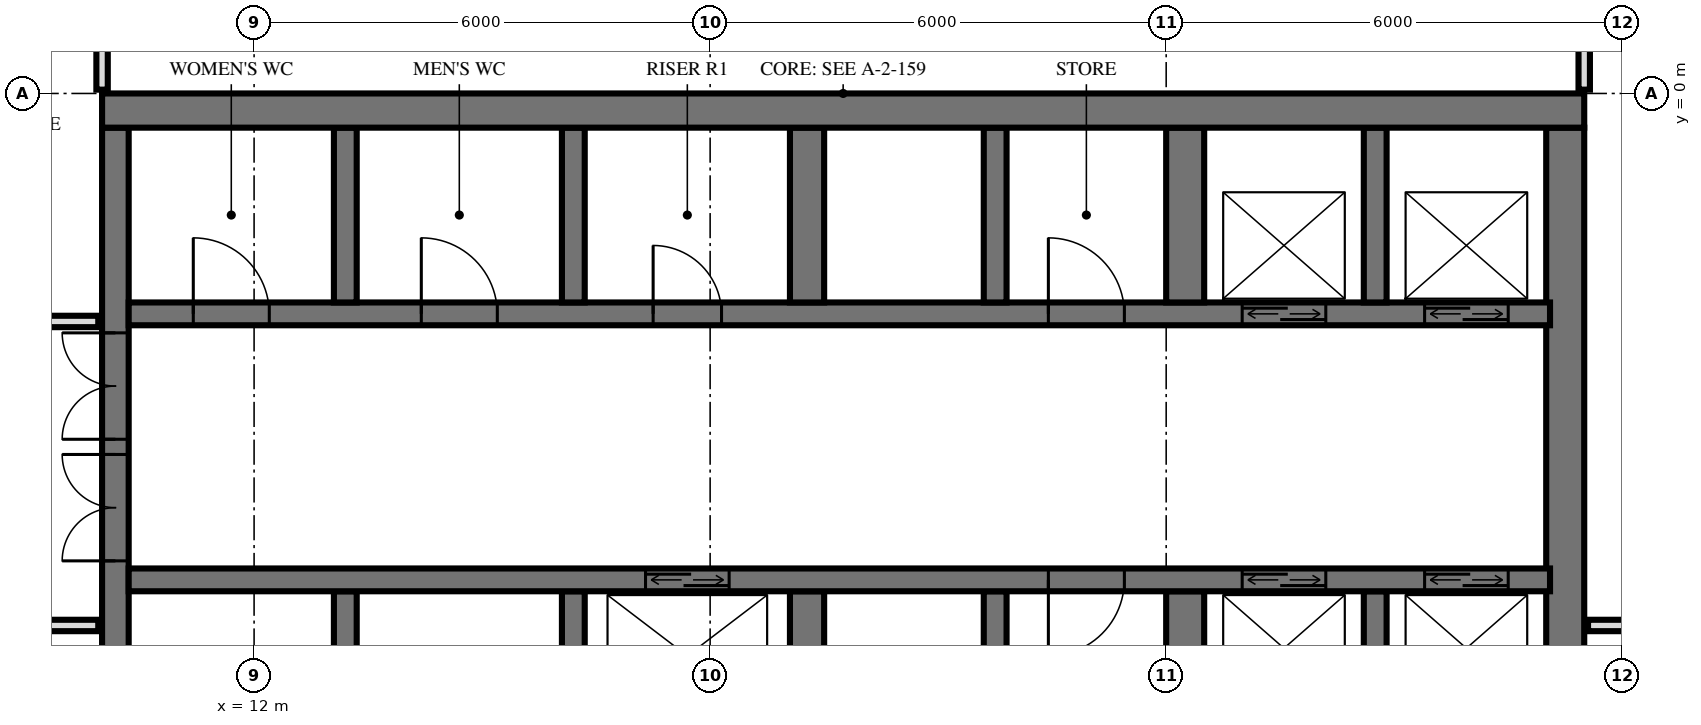
"""IFC4 building model, lengths in metres.
Left out: names, types, materials, properties, quantities, classifications, styles, units other than length and angle.
Written with IfcOpenShell. Run it as: python <this file> out.ifc"""

import sys

from ifc_helpers import new_model, si_unit, direction, frame, frame_2d, origin, place, context, subcontext, project, spatial, rectangle, extrude, element, fill, save


model = new_model("IFC4")
c1 = context("Model", 3, precision=1e-05, world=origin(), true_north=direction((0.0, 1.0)))
c2 = subcontext(c1, "Body", "Model", "MODEL_VIEW")
j1 = project(units=[si_unit("LENGTHUNIT", "METRE"), si_unit("PLANEANGLEUNIT", "RADIAN")], contexts=[c1])
p1 = place(None, origin())
s1 = spatial("IfcSite", under=j1, at=p1, CompositionType="ELEMENT")
p2 = place(p1, origin())
s2 = spatial("IfcBuilding", under=s1, at=p2, CompositionType="ELEMENT")
p3 = place(p2, frame((0.0, 0.0, 99.6)))
s3 = spatial("IfcBuildingStorey", under=s2, at=p3, CompositionType="ELEMENT", Elevation=99.6)
p4 = place(p3, frame((10.0, -0.225, 0.0), z_axis=(0.0, 0.0, 1.0), x_axis=(1.0, 0.0, 0.0)))
e1 = element("IfcWall", 1, at=p4, inside=s3, PredefinedType="SHEAR", context=c2, shape_type="SweptSolid", body=[
    extrude(rectangle(XDim=19.5, YDim=0.45, at=frame_2d((9.75, 0.0))), origin(), (0.0, 0.0, 1.0), 3.6),
])
p5 = place(p3, frame((10.175, -14.55, 0.0), z_axis=(0.0, 0.0, 1.0), x_axis=(0.0, 1.0, 0.0)))
e2 = element("IfcWall", 2, at=p5, inside=s3, PredefinedType="SHEAR", context=c2, shape_type="SweptSolid", body=[
    extrude(rectangle(XDim=14.1, YDim=0.35, at=frame_2d((7.05, 0.0))), origin(), (0.0, 0.0, 1.0), 3.6),
])
p6 = place(p5, frame((8.4, 0.0, 0.0)))
e3 = element("IfcOpeningElement", 3, at=p6, cuts=e2, PredefinedType="OPENING", context=c2, shape_type="SweptSolid", body=[
    extrude(rectangle(XDim=1.4, YDim=2.4, at=frame_2d((0.7, 1.2))), frame((0.0, 0.185, 0.0), z_axis=(0.0, -1.0, 0.0), x_axis=(1.0, 0.0, 0.0)), (0.0, 0.0, 1.0), 0.37),
])
p7 = place(p5, frame((10.0, 0.0, 0.0)))
e4 = element("IfcOpeningElement", 4, at=p7, cuts=e2, PredefinedType="OPENING", context=c2, shape_type="SweptSolid", body=[
    extrude(rectangle(XDim=1.4, YDim=2.4, at=frame_2d((0.7, 1.2))), frame((0.0, 0.185, 0.0), z_axis=(0.0, -1.0, 0.0), x_axis=(1.0, 0.0, 0.0)), (0.0, 0.0, 1.0), 0.37),
])
p8 = place(p5, frame((4.0, 0.0, 0.0)))
e5 = element("IfcOpeningElement", 5, at=p8, cuts=e2, PredefinedType="OPENING", context=c2, shape_type="SweptSolid", body=[
    extrude(rectangle(XDim=1.2, YDim=2.1, at=frame_2d((0.6, 1.05))), frame((0.0, 0.185, 0.0), z_axis=(0.0, -1.0, 0.0), x_axis=(1.0, 0.0, 0.0)), (0.0, 0.0, 1.0), 0.37),
])
p9 = place(p3, frame((29.25, -14.55, 0.0), z_axis=(0.0, 0.0, 1.0), x_axis=(0.0, 1.0, 0.0)))
e6 = element("IfcWall", 6, at=p9, inside=s3, PredefinedType="SHEAR", context=c2, shape_type="SweptSolid", body=[
    extrude(rectangle(XDim=14.1, YDim=0.5, at=frame_2d((7.05, 0.0))), origin(), (0.0, 0.0, 1.0), 3.6),
])
p10 = place(p3, frame((10.35, -2.9, 0.0), z_axis=(0.0, 0.0, 1.0), x_axis=(1.0, 0.0, 0.0)))
e7 = element("IfcWall", 7, at=p10, inside=s3, PredefinedType="SHEAR", context=c2, shape_type="SweptSolid", body=[
    extrude(rectangle(XDim=18.7, YDim=0.3, at=frame_2d((9.35, 0.0))), origin(), (0.0, 0.0, 1.0), 3.6),
])
p11 = place(p10, frame((14.65, 0.0, 0.0)))
e8 = element("IfcOpeningElement", 8, at=p11, cuts=e7, PredefinedType="OPENING", context=c2, shape_type="SweptSolid", body=[
    extrude(rectangle(XDim=1.1, YDim=2.1, at=frame_2d((0.55, 1.05))), frame((0.0, 0.16, 0.0), z_axis=(0.0, -1.0, 0.0), x_axis=(1.0, 0.0, 0.0)), (0.0, 0.0, 1.0), 0.32),
])
p12 = place(p10, frame((17.05, 0.0, 0.0)))
e9 = element("IfcOpeningElement", 9, at=p12, cuts=e7, PredefinedType="OPENING", context=c2, shape_type="SweptSolid", body=[
    extrude(rectangle(XDim=1.1, YDim=2.1, at=frame_2d((0.55, 1.05))), frame((0.0, 0.16, 0.0), z_axis=(0.0, -1.0, 0.0), x_axis=(1.0, 0.0, 0.0)), (0.0, 0.0, 1.0), 0.32),
])
p13 = place(p10, frame((6.9, 0.0, 0.0)))
e10 = element("IfcOpeningElement", 10, at=p13, cuts=e7, PredefinedType="OPENING", context=c2, shape_type="SweptSolid", body=[
    extrude(rectangle(XDim=0.9, YDim=2.1, at=frame_2d((0.45, 1.05))), frame((0.0, 0.16, 0.0), z_axis=(0.0, -1.0, 0.0), x_axis=(1.0, 0.0, 0.0)), (0.0, 0.0, 1.0), 0.32),
])
p14 = place(p10, frame((0.85, 0.0, 0.0)))
e11 = element("IfcOpeningElement", 11, at=p14, cuts=e7, PredefinedType="OPENING", context=c2, shape_type="SweptSolid", body=[
    extrude(rectangle(XDim=1.0, YDim=2.1, at=frame_2d((0.5, 1.05))), frame((0.0, 0.16, 0.0), z_axis=(0.0, -1.0, 0.0), x_axis=(1.0, 0.0, 0.0)), (0.0, 0.0, 1.0), 0.32),
])
p15 = place(p10, frame((3.85, 0.0, 0.0)))
e12 = element("IfcOpeningElement", 12, at=p15, cuts=e7, PredefinedType="OPENING", context=c2, shape_type="SweptSolid", body=[
    extrude(rectangle(XDim=1.0, YDim=2.1, at=frame_2d((0.5, 1.05))), frame((0.0, 0.16, 0.0), z_axis=(0.0, -1.0, 0.0), x_axis=(1.0, 0.0, 0.0)), (0.0, 0.0, 1.0), 0.32),
])
p16 = place(p10, frame((12.1, 0.0, 0.0)))
e13 = element("IfcOpeningElement", 13, at=p16, cuts=e7, PredefinedType="OPENING", context=c2, shape_type="SweptSolid", body=[
    extrude(rectangle(XDim=1.0, YDim=2.1, at=frame_2d((0.5, 1.05))), frame((0.0, 0.16, 0.0), z_axis=(0.0, -1.0, 0.0), x_axis=(1.0, 0.0, 0.0)), (0.0, 0.0, 1.0), 0.32),
])
p17 = place(p3, frame((10.35, -6.4, 0.0), z_axis=(0.0, 0.0, 1.0), x_axis=(1.0, 0.0, 0.0)))
e14 = element("IfcWall", 14, at=p17, inside=s3, PredefinedType="SHEAR", context=c2, shape_type="SweptSolid", body=[
    extrude(rectangle(XDim=18.7, YDim=0.3, at=frame_2d((9.35, 0.0))), origin(), (0.0, 0.0, 1.0), 3.6),
])
p18 = place(p17, frame((14.65, 0.0, 0.0)))
e15 = element("IfcOpeningElement", 15, at=p18, cuts=e14, PredefinedType="OPENING", context=c2, shape_type="SweptSolid", body=[
    extrude(rectangle(XDim=1.1, YDim=2.1, at=frame_2d((0.55, 1.05))), frame((0.0, 0.16, 0.0), z_axis=(0.0, -1.0, 0.0), x_axis=(1.0, 0.0, 0.0)), (0.0, 0.0, 1.0), 0.32),
])
p19 = place(p17, frame((17.05, 0.0, 0.0)))
e16 = element("IfcOpeningElement", 16, at=p19, cuts=e14, PredefinedType="OPENING", context=c2, shape_type="SweptSolid", body=[
    extrude(rectangle(XDim=1.1, YDim=2.1, at=frame_2d((0.55, 1.05))), frame((0.0, 0.16, 0.0), z_axis=(0.0, -1.0, 0.0), x_axis=(1.0, 0.0, 0.0)), (0.0, 0.0, 1.0), 0.32),
])
p20 = place(p17, frame((6.8, 0.0, 0.0)))
e17 = element("IfcOpeningElement", 17, at=p20, cuts=e14, PredefinedType="OPENING", context=c2, shape_type="SweptSolid", body=[
    extrude(rectangle(XDim=1.1, YDim=2.1, at=frame_2d((0.55, 1.05))), frame((0.0, 0.16, 0.0), z_axis=(0.0, -1.0, 0.0), x_axis=(1.0, 0.0, 0.0)), (0.0, 0.0, 1.0), 0.32),
])
p21 = place(p17, frame((12.1, 0.0, 0.0)))
e18 = element("IfcOpeningElement", 18, at=p21, cuts=e14, PredefinedType="OPENING", context=c2, shape_type="SweptSolid", body=[
    extrude(rectangle(XDim=1.0, YDim=2.1, at=frame_2d((0.5, 1.05))), frame((0.0, 0.16, 0.0), z_axis=(0.0, -1.0, 0.0), x_axis=(1.0, 0.0, 0.0)), (0.0, 0.0, 1.0), 0.32),
])
for number, where, z_axis, x_axis in (
    (19, (13.2, -2.75, 0.0), (0.0, 0.0, 1.0), (0.0, 1.0, 0.0)),
    (20, (13.2, -8.85, 0.0), (0.0, 0.0, 1.0), (0.0, 1.0, 0.0)),
    (21, (16.2, -2.75, 0.0), (0.0, 0.0, 1.0), (0.0, 1.0, 0.0)),
    (22, (16.2, -8.85, 0.0), (0.0, 0.0, 1.0), (0.0, 1.0, 0.0)),
):
    element("IfcWall", number, at=place(p3, frame(where, z_axis=z_axis, x_axis=x_axis)), inside=s3, PredefinedType="SHEAR", context=c2, shape_type="SweptSolid", body=[
        extrude(rectangle(XDim=2.3, YDim=0.3, at=frame_2d((1.15, 0.0))), origin(), (0.0, 0.0, 1.0), 3.6),
    ])
for number, where, z_axis, x_axis in (
    (23, (19.275, -2.75, 0.0), (0.0, 0.0, 1.0), (0.0, 1.0, 0.0)),
    (24, (19.275, -8.85, 0.0), (0.0, 0.0, 1.0), (0.0, 1.0, 0.0)),
):
    element("IfcWall", number, at=place(p3, frame(where, z_axis=z_axis, x_axis=x_axis)), inside=s3, PredefinedType="SHEAR", context=c2, shape_type="SweptSolid", body=[
        extrude(rectangle(XDim=2.3, YDim=0.45, at=frame_2d((1.15, 0.0))), origin(), (0.0, 0.0, 1.0), 3.6),
    ])
for number, where, z_axis, x_axis in (
    (25, (21.75, -2.75, 0.0), (0.0, 0.0, 1.0), (0.0, 1.0, 0.0)),
    (26, (21.75, -8.85, 0.0), (0.0, 0.0, 1.0), (0.0, 1.0, 0.0)),
):
    element("IfcWall", number, at=place(p3, frame(where, z_axis=z_axis, x_axis=x_axis)), inside=s3, PredefinedType="SHEAR", context=c2, shape_type="SweptSolid", body=[
        extrude(rectangle(XDim=2.3, YDim=0.3, at=frame_2d((1.15, 0.0))), origin(), (0.0, 0.0, 1.0), 3.6),
    ])
for number, where, z_axis, x_axis in (
    (27, (24.25, -2.75, 0.0), (0.0, 0.0, 1.0), (0.0, 1.0, 0.0)),
    (28, (24.25, -8.85, 0.0), (0.0, 0.0, 1.0), (0.0, 1.0, 0.0)),
):
    element("IfcWall", number, at=place(p3, frame(where, z_axis=z_axis, x_axis=x_axis)), inside=s3, PredefinedType="SHEAR", context=c2, shape_type="SweptSolid", body=[
        extrude(rectangle(XDim=2.3, YDim=0.5, at=frame_2d((1.15, 0.0))), origin(), (0.0, 0.0, 1.0), 3.6),
    ])
for number, where, z_axis, x_axis in (
    (29, (26.75, -2.75, 0.0), (0.0, 0.0, 1.0), (0.0, 1.0, 0.0)),
    (30, (26.75, -8.85, 0.0), (0.0, 0.0, 1.0), (0.0, 1.0, 0.0)),
):
    element("IfcWall", number, at=place(p3, frame(where, z_axis=z_axis, x_axis=x_axis)), inside=s3, PredefinedType="SHEAR", context=c2, shape_type="SweptSolid", body=[
        extrude(rectangle(XDim=2.3, YDim=0.3, at=frame_2d((1.15, 0.0))), origin(), (0.0, 0.0, 1.0), 3.6),
    ])
p22 = place(p3, frame((29.5, 0.05, 0.0), z_axis=(0.0, 0.0, 1.0), x_axis=(0.0, 1.0, 0.0)))
e31 = element("IfcWall", 31, at=p22, inside=s3, PredefinedType="PARTITIONING", context=c2, shape_type="SweptSolid", body=[
    extrude(rectangle(XDim=0.827, YDim=0.15, at=frame_2d((0.414, 0.0))), origin(), (0.0, 0.0, 1.0), 3.32),
])
p23 = place(p3, frame((10.0, 0.05, 0.0), z_axis=(0.0, 0.0, 1.0), x_axis=(0.0, 1.0, 0.0)))
e32 = element("IfcWall", 32, at=p23, inside=s3, PredefinedType="PARTITIONING", context=c2, shape_type="SweptSolid", body=[
    extrude(rectangle(XDim=0.97, YDim=0.15, at=frame_2d((0.485, 0.0))), origin(), (0.0, 0.0, 1.0), 3.32),
])
p24 = place(p3, frame((-9.95, -7.0, 0.0), z_axis=(0.0, 0.0, 1.0), x_axis=(1.0, 0.0, 0.0)))
e33 = element("IfcWall", 33, at=p24, inside=s3, PredefinedType="PARTITIONING", context=c2, shape_type="SweptSolid", body=[
    extrude(rectangle(XDim=19.9, YDim=0.15, at=frame_2d((9.95, 0.0))), origin(), (0.0, 0.0, 1.0), 3.32),
])
p25 = place(p24, frame((9.45, 0.0, 0.0)))
e34 = element("IfcOpeningElement", 34, at=p25, cuts=e33, PredefinedType="OPENING", context=c2, shape_type="SweptSolid", body=[
    extrude(rectangle(XDim=1.0, YDim=2.1, at=frame_2d((0.5, 1.05))), frame((0.0, 0.085, 0.0), z_axis=(0.0, -1.0, 0.0), x_axis=(1.0, 0.0, 0.0)), (0.0, 0.0, 1.0), 0.17),
])
p26 = place(p24, frame((15.45, 0.0, 0.0)))
e35 = element("IfcOpeningElement", 35, at=p26, cuts=e33, PredefinedType="OPENING", context=c2, shape_type="SweptSolid", body=[
    extrude(rectangle(XDim=1.0, YDim=2.1, at=frame_2d((0.5, 1.05))), frame((0.0, 0.085, 0.0), z_axis=(0.0, -1.0, 0.0), x_axis=(1.0, 0.0, 0.0)), (0.0, 0.0, 1.0), 0.17),
])
p27 = place(p3, frame((29.55, -7.0, 0.0), z_axis=(0.0, 0.0, 1.0), x_axis=(1.0, 0.0, 0.0)))
e36 = element("IfcWall", 36, at=p27, inside=s3, PredefinedType="PLUMBINGWALL", context=c2, shape_type="SweptSolid", body=[
    extrude(rectangle(XDim=3.57, YDim=0.15, at=frame_2d((1.785, 0.0))), origin(), (0.0, 0.0, 1.0), 3.32),
])
p28 = place(p27, frame((1.4, 0.0, 0.0)))
e37 = element("IfcOpeningElement", 37, at=p28, cuts=e36, PredefinedType="OPENING", context=c2, shape_type="SweptSolid", body=[
    extrude(rectangle(XDim=0.9, YDim=2.1, at=frame_2d((0.45, 1.05))), frame((0.0, 0.085, 0.0), z_axis=(0.0, -1.0, 0.0), x_axis=(1.0, 0.0, 0.0)), (0.0, 0.0, 1.0), 0.17),
])
p29 = place(p3, frame((-9.95, -3.0, 0.0), z_axis=(0.0, 0.0, 1.0), x_axis=(1.0, 0.0, 0.0)))
e38 = element("IfcWall", 38, at=p29, inside=s3, PredefinedType="PARTITIONING", context=c2, shape_type="SweptSolid", body=[
    extrude(rectangle(XDim=19.9, YDim=0.15, at=frame_2d((9.95, 0.0))), origin(), (0.0, 0.0, 1.0), 3.32),
])
p30 = place(p29, frame((3.45, 0.0, 0.0)))
e39 = element("IfcOpeningElement", 39, at=p30, cuts=e38, PredefinedType="OPENING", context=c2, shape_type="SweptSolid", body=[
    extrude(rectangle(XDim=1.0, YDim=2.1, at=frame_2d((0.5, 1.05))), frame((0.0, 0.085, 0.0), z_axis=(0.0, -1.0, 0.0), x_axis=(1.0, 0.0, 0.0)), (0.0, 0.0, 1.0), 0.17),
])
p31 = place(p29, frame((8.95, 0.0, 0.0)))
e40 = element("IfcOpeningElement", 40, at=p31, cuts=e38, PredefinedType="OPENING", context=c2, shape_type="SweptSolid", body=[
    extrude(rectangle(XDim=1.0, YDim=2.1, at=frame_2d((0.5, 1.05))), frame((0.0, 0.085, 0.0), z_axis=(0.0, -1.0, 0.0), x_axis=(1.0, 0.0, 0.0)), (0.0, 0.0, 1.0), 0.17),
])
p32 = place(p29, frame((11.7, 0.0, 0.0)))
e41 = element("IfcOpeningElement", 41, at=p32, cuts=e38, PredefinedType="OPENING", context=c2, shape_type="SweptSolid", body=[
    extrude(rectangle(XDim=1.0, YDim=2.1, at=frame_2d((0.5, 1.05))), frame((0.0, 0.085, 0.0), z_axis=(0.0, -1.0, 0.0), x_axis=(1.0, 0.0, 0.0)), (0.0, 0.0, 1.0), 0.17),
])
p33 = place(p29, frame((16.2, 0.0, 0.0)))
e42 = element("IfcOpeningElement", 42, at=p33, cuts=e38, PredefinedType="OPENING", context=c2, shape_type="SweptSolid", body=[
    extrude(rectangle(XDim=1.0, YDim=2.1, at=frame_2d((0.5, 1.05))), frame((0.0, 0.085, 0.0), z_axis=(0.0, -1.0, 0.0), x_axis=(1.0, 0.0, 0.0)), (0.0, 0.0, 1.0), 0.17),
])
p34 = place(p11, origin())
e43 = element("IfcDoor", 43, at=p34, inside=s3, OperationType="DOUBLE_DOOR_SLIDING", PredefinedType="USERDEFINED", context=c2, shape_type="SweptSolid", body=[
    extrude(rectangle(XDim=1.1, YDim=2.1, at=frame_2d((0.55, 1.05))), frame((0.0, 0.025, 0.0), z_axis=(0.0, -1.0, 0.0), x_axis=(1.0, 0.0, 0.0)), (0.0, 0.0, 1.0), 0.05),
])
fill(e8, e43)
p35 = place(p12, origin())
e44 = element("IfcDoor", 44, at=p35, inside=s3, OperationType="DOUBLE_DOOR_SLIDING", PredefinedType="USERDEFINED", context=c2, shape_type="SweptSolid", body=[
    extrude(rectangle(XDim=1.1, YDim=2.1, at=frame_2d((0.55, 1.05))), frame((0.0, 0.025, 0.0), z_axis=(0.0, -1.0, 0.0), x_axis=(1.0, 0.0, 0.0)), (0.0, 0.0, 1.0), 0.05),
])
fill(e9, e44)
p36 = place(p18, origin())
e45 = element("IfcDoor", 45, at=p36, inside=s3, OperationType="DOUBLE_DOOR_SLIDING", PredefinedType="USERDEFINED", context=c2, shape_type="SweptSolid", body=[
    extrude(rectangle(XDim=1.1, YDim=2.1, at=frame_2d((0.55, 1.05))), frame((0.0, 0.025, 0.0), z_axis=(0.0, -1.0, 0.0), x_axis=(1.0, 0.0, 0.0)), (0.0, 0.0, 1.0), 0.05),
])
fill(e15, e45)
p37 = place(p19, origin())
e46 = element("IfcDoor", 46, at=p37, inside=s3, OperationType="DOUBLE_DOOR_SLIDING", PredefinedType="USERDEFINED", context=c2, shape_type="SweptSolid", body=[
    extrude(rectangle(XDim=1.1, YDim=2.1, at=frame_2d((0.55, 1.05))), frame((0.0, 0.025, 0.0), z_axis=(0.0, -1.0, 0.0), x_axis=(1.0, 0.0, 0.0)), (0.0, 0.0, 1.0), 0.05),
])
fill(e16, e46)
p38 = place(p20, origin())
e47 = element("IfcDoor", 47, at=p38, inside=s3, OperationType="DOUBLE_DOOR_SLIDING", PredefinedType="USERDEFINED", context=c2, shape_type="SweptSolid", body=[
    extrude(rectangle(XDim=1.1, YDim=2.1, at=frame_2d((0.55, 1.05))), frame((0.0, 0.025, 0.0), z_axis=(0.0, -1.0, 0.0), x_axis=(1.0, 0.0, 0.0)), (0.0, 0.0, 1.0), 0.05),
])
fill(e17, e47)
p39 = place(p6, origin())
e48 = element("IfcDoor", 48, at=p39, inside=s3, OperationType="DOUBLE_DOOR_SINGLE_SWING", PredefinedType="DOOR", context=c2, shape_type="SweptSolid", body=[
    extrude(rectangle(XDim=1.4, YDim=2.4, at=frame_2d((0.7, 1.2))), frame((0.0, 0.025, 0.0), z_axis=(0.0, -1.0, 0.0), x_axis=(1.0, 0.0, 0.0)), (0.0, 0.0, 1.0), 0.05),
])
fill(e3, e48)
p40 = place(p7, origin())
e49 = element("IfcDoor", 49, at=p40, inside=s3, OperationType="DOUBLE_DOOR_SINGLE_SWING", PredefinedType="DOOR", context=c2, shape_type="SweptSolid", body=[
    extrude(rectangle(XDim=1.4, YDim=2.4, at=frame_2d((0.7, 1.2))), frame((0.0, 0.025, 0.0), z_axis=(0.0, -1.0, 0.0), x_axis=(1.0, 0.0, 0.0)), (0.0, 0.0, 1.0), 0.05),
])
fill(e4, e49)
p41 = place(p13, origin())
e50 = element("IfcDoor", 50, at=p41, inside=s3, OperationType="SINGLE_SWING_RIGHT", PredefinedType="DOOR", context=c2, shape_type="SweptSolid", body=[
    extrude(rectangle(XDim=0.9, YDim=2.1, at=frame_2d((0.45, 1.05))), frame((0.0, 0.025, 0.0), z_axis=(0.0, -1.0, 0.0), x_axis=(1.0, 0.0, 0.0)), (0.0, 0.0, 1.0), 0.05),
])
fill(e10, e50)
p42 = place(p14, origin())
e51 = element("IfcDoor", 51, at=p42, inside=s3, OperationType="SINGLE_SWING_RIGHT", PredefinedType="DOOR", context=c2, shape_type="SweptSolid", body=[
    extrude(rectangle(XDim=1.0, YDim=2.1, at=frame_2d((0.5, 1.05))), frame((0.0, 0.025, 0.0), z_axis=(0.0, -1.0, 0.0), x_axis=(1.0, 0.0, 0.0)), (0.0, 0.0, 1.0), 0.05),
])
fill(e11, e51)
p43 = place(p15, origin())
e52 = element("IfcDoor", 52, at=p43, inside=s3, OperationType="SINGLE_SWING_RIGHT", PredefinedType="DOOR", context=c2, shape_type="SweptSolid", body=[
    extrude(rectangle(XDim=1.0, YDim=2.1, at=frame_2d((0.5, 1.05))), frame((0.0, 0.025, 0.0), z_axis=(0.0, -1.0, 0.0), x_axis=(1.0, 0.0, 0.0)), (0.0, 0.0, 1.0), 0.05),
])
fill(e12, e52)
p44 = place(p16, origin())
e53 = element("IfcDoor", 53, at=p44, inside=s3, OperationType="SINGLE_SWING_RIGHT", PredefinedType="DOOR", context=c2, shape_type="SweptSolid", body=[
    extrude(rectangle(XDim=1.0, YDim=2.1, at=frame_2d((0.5, 1.05))), frame((0.0, 0.025, 0.0), z_axis=(0.0, -1.0, 0.0), x_axis=(1.0, 0.0, 0.0)), (0.0, 0.0, 1.0), 0.05),
])
fill(e13, e53)
p45 = place(p21, frame((0.5, 0.0, 0.0), z_axis=(0.0, 0.0, 1.0), x_axis=(-1.0, 0.0, 0.0)))
e54 = element("IfcDoor", 54, at=p45, inside=s3, OperationType="SINGLE_SWING_LEFT", PredefinedType="DOOR", context=c2, shape_type="SweptSolid", body=[
    extrude(rectangle(XDim=1.0, YDim=2.1, at=frame_2d((0.0, 1.05))), frame((0.0, -0.025, 0.0), z_axis=(0.0, 1.0, 0.0), x_axis=(-1.0, 0.0, 0.0)), (0.0, 0.0, 1.0), 0.05),
])
fill(e18, e54)
save(model, sys.argv[1])
